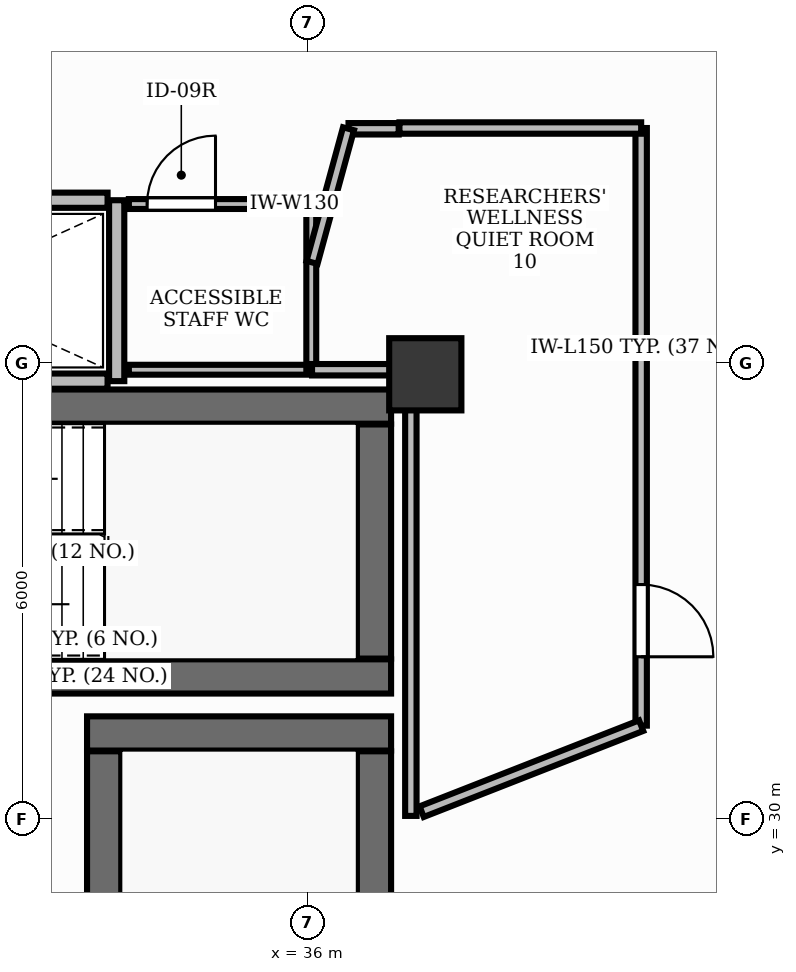
"""IFC4 building model, lengths in metres.
Left out: names, types, materials, properties, quantities, classifications, styles, units other than length and angle.
Written with IfcOpenShell. Run it as: python <this file> out.ifc"""

import sys

from ifc_helpers import new_model, si_unit, direction, frame, frame_2d, origin, origin_2d, place, context, subcontext, project, spatial, rectangle, extrude, element, fill, save


model = new_model("IFC4")
c1 = context("Model", 3, precision=1e-05, world=origin(), true_north=direction((0.0, 1.0)))
c2 = subcontext(c1, "Body", "Model", "MODEL_VIEW")
j1 = project(units=[si_unit("LENGTHUNIT", "METRE"), si_unit("PLANEANGLEUNIT", "RADIAN")], contexts=[c1])
p1 = place(None, origin())
s1 = spatial("IfcSite", under=j1, at=p1, CompositionType="ELEMENT")
p2 = place(p1, origin())
s2 = spatial("IfcBuilding", under=s1, at=p2, CompositionType="ELEMENT")
p3 = place(p2, frame((0.0, 0.0, 115.2)))
s3 = spatial("IfcBuildingStorey", under=s2, at=p3, CompositionType="ELEMENT", Elevation=115.2)
p4 = place(p3, frame((28.852, 35.425, 0.0), z_axis=(0.0, 0.0, 1.0), x_axis=(1.0, 0.0, 0.0)))
e1 = element("IfcWall", 1, at=p4, inside=s3, PredefinedType="SHEAR", context=c2, shape_type="SweptSolid", body=[
    extrude(rectangle(XDim=8.248, YDim=0.45, at=frame_2d((4.124, 0.0))), origin(), (0.0, 0.0, 1.0), 3.9),
])
p5 = place(p3, frame((28.35, 31.875, 0.0), z_axis=(0.0, 0.0, 1.0), x_axis=(1.0, 0.0, 0.0)))
e2 = element("IfcWall", 2, at=p5, inside=s3, PredefinedType="SHEAR", context=c2, shape_type="SweptSolid", body=[
    extrude(rectangle(XDim=8.75, YDim=0.45, at=frame_2d((4.375, 0.0))), origin(), (0.0, 0.0, 1.0), 3.9),
])
p6 = place(p3, frame((36.875, 32.11, 0.0), z_axis=(0.0, 0.0, 1.0), x_axis=(0.0, 1.0, 0.0)))
e3 = element("IfcWall", 3, at=p6, inside=s3, PredefinedType="SHEAR", context=c2, shape_type="SweptSolid", body=[
    extrude(rectangle(XDim=3.08, YDim=0.45, at=frame_2d((1.54, 0.0))), origin(), (0.0, 0.0, 1.0), 3.9),
])
p7 = place(p3, frame((33.1, 31.125, 0.0), z_axis=(0.0, 0.0, 1.0), x_axis=(1.0, 0.0, 0.0)))
e4 = element("IfcWall", 4, at=p7, inside=s3, PredefinedType="SHEAR", context=c2, shape_type="SweptSolid", body=[
    extrude(rectangle(XDim=4.0, YDim=0.45, at=frame_2d((2.0, 0.0))), origin(), (0.0, 0.0, 1.0), 3.9),
])
p8 = place(p3, frame((36.875, 23.11, 0.0), z_axis=(0.0, 0.0, 1.0), x_axis=(0.0, 1.0, 0.0)))
e5 = element("IfcWall", 5, at=p8, inside=s3, PredefinedType="SHEAR", context=c2, shape_type="SweptSolid", body=[
    extrude(rectangle(XDim=7.78, YDim=0.45, at=frame_2d((3.89, 0.0))), origin(), (0.0, 0.0, 1.0), 3.9),
])
p9 = place(p3, frame((33.325, 23.11, 0.0), z_axis=(0.0, 0.0, 1.0), x_axis=(0.0, 1.0, 0.0)))
e6 = element("IfcWall", 6, at=p9, inside=s3, PredefinedType="SHEAR", context=c2, shape_type="SweptSolid", body=[
    extrude(rectangle(XDim=7.78, YDim=0.45, at=frame_2d((3.89, 0.0))), origin(), (0.0, 0.0, 1.0), 3.9),
])
p10 = place(p9, frame((0.2, 0.0, 0.0)))
e7 = element("IfcOpeningElement", 7, at=p10, cuts=e6, PredefinedType="OPENING", context=c2, shape_type="SweptSolid", body=[
    extrude(rectangle(XDim=1.05, YDim=2.15, at=frame_2d((0.525, 1.075))), frame((0.0, 0.24, 0.0), z_axis=(0.0, -1.0, 0.0), x_axis=(1.0, 0.0, 0.0)), (0.0, 0.0, 1.0), 0.48),
])
p11 = place(p3, frame((37.55, 35.85, -0.0), z_axis=(0.0, 0.0, 1.0), x_axis=(1.0, 0.0, 0.0)))
e8 = element("IfcColumn", 8, at=p11, inside=s3, PredefinedType="PILASTER", context=c2, shape_type="SweptSolid", body=[
    extrude(rectangle(XDim=0.95, YDim=0.95, at=origin_2d()), origin(), (0.0, 0.0, 1.0), 3.901),
])
p12 = place(p3, frame((33.49, 35.76, 0.0), z_axis=(0.0, 0.0, 1.0), x_axis=(0.0, 1.0, 0.0)))
e9 = element("IfcWall", 9, at=p12, inside=s3, PredefinedType="PARTITIONING", context=c2, shape_type="SweptSolid", body=[
    extrude(rectangle(XDim=2.38, YDim=0.2, at=frame_2d((1.19, 0.0))), origin(), (0.0, 0.0, 1.0), 2.91),
])
for number, where, z_axis, x_axis in (
    (10, (28.8, 35.76, 0.0), (0.0, 0.0, 1.0), (1.0, 0.0, 0.0)),
    (11, (28.8, 38.14, 0.0), (0.0, 0.0, 1.0), (1.0, 0.0, 0.0)),
):
    element("IfcWall", number, at=place(p3, frame(where, z_axis=z_axis, x_axis=x_axis)), inside=s3, PredefinedType="PARTITIONING", context=c2, shape_type="SweptSolid", body=[
        extrude(rectangle(XDim=4.57, YDim=0.2, at=frame_2d((2.285, 0.0))), origin(), (0.0, 0.0, 1.0), 2.91),
    ])
p13 = place(p3, frame((33.65, 38.09, 0.0), z_axis=(0.0, 0.0, 1.0), x_axis=(1.0, 0.0, 0.0)))
e12 = element("IfcWall", 12, at=p13, inside=s3, PredefinedType="PARTITIONING", context=c2, shape_type="SweptSolid", body=[
    extrude(rectangle(XDim=2.4, YDim=0.13, at=frame_2d((1.2, 0.0))), origin(), (0.0, 0.0, 1.0), 2.91),
])
p14 = place(p13, frame((0.24, 0.0, 0.0)))
e13 = element("IfcOpeningElement", 13, at=p14, cuts=e12, PredefinedType="OPENING", context=c2, shape_type="SweptSolid", body=[
    extrude(rectangle(XDim=0.9, YDim=2.15, at=frame_2d((0.45, 1.075))), frame((0.0, 0.08, 0.0), z_axis=(0.0, -1.0, 0.0), x_axis=(1.0, 0.0, 0.0)), (0.0, 0.0, 1.0), 0.16),
])
p15 = place(p3, frame((40.39, 39.09, 0.0), z_axis=(0.0, 0.0, 1.0), x_axis=(0.0, -1.0, 0.0)))
e14 = element("IfcWall", 14, at=p15, inside=s3, PredefinedType="PARTITIONING", context=c2, shape_type="SweptSolid", body=[
    extrude(rectangle(XDim=7.862, YDim=0.15, at=frame_2d((3.931, 0.0))), origin(), (0.0, 0.0, 1.0), 2.91),
])
p16 = place(p15, frame((6.006, 0.0, 0.0)))
e15 = element("IfcOpeningElement", 15, at=p16, cuts=e14, PredefinedType="OPENING", context=c2, shape_type="SweptSolid", body=[
    extrude(rectangle(XDim=0.95, YDim=2.15, at=frame_2d((0.475, 1.075))), frame((0.0, 0.09, 0.0), z_axis=(0.0, -1.0, 0.0), x_axis=(1.0, 0.0, 0.0)), (0.0, 0.0, 1.0), 0.18),
])
p17 = place(p3, frame((36.05, 35.91, 0.0), z_axis=(0.0, 0.0, 1.0), x_axis=(-1.0, 0.0, 0.0)))
e16 = element("IfcWall", 16, at=p17, inside=s3, PredefinedType="PARTITIONING", context=c2, shape_type="SweptSolid", body=[
    extrude(rectangle(XDim=2.4, YDim=0.13, at=frame_2d((1.2, 0.0))), origin(), (0.0, 0.0, 1.0), 2.91),
])
p18 = place(p3, frame((36.05, 38.09, 0.0), z_axis=(0.0, 0.0, 1.0), x_axis=(0.0, -1.0, 0.0)))
e17 = element("IfcWall", 17, at=p18, inside=s3, PredefinedType="PARTITIONING", context=c2, shape_type="SweptSolid", body=[
    extrude(rectangle(XDim=2.18, YDim=0.13, at=frame_2d((1.09, 0.0))), origin(), (0.0, 0.0, 1.0), 2.91),
])
p19 = place(p3, frame((36.54, 39.08, 0.0), z_axis=(0.0, 0.0, 1.0), x_axis=(1.0, 0.0, 0.0)))
e18 = element("IfcWall", 18, at=p19, inside=s3, PredefinedType="PARTITIONING", context=c2, shape_type="SweptSolid", body=[
    extrude(rectangle(XDim=0.66, YDim=0.15, at=frame_2d((0.33, 0.0))), origin(), (0.0, 0.0, 1.0), 2.91),
])
p20 = place(p3, frame((37.21, 39.09, 0.0), z_axis=(0.0, 0.0, 1.0), x_axis=(1.0, 0.0, 0.0)))
e19 = element("IfcWall", 19, at=p20, inside=s3, PredefinedType="PARTITIONING", context=c2, shape_type="SweptSolid", body=[
    extrude(rectangle(XDim=3.18, YDim=0.15, at=frame_2d((1.59, 0.0))), origin(), (0.0, 0.0, 1.0), 2.91),
])
p21 = place(p3, frame((40.39, 31.228, 0.0), z_axis=(0.0, 0.0, 1.0), x_axis=(-0.931038232899, -0.364921647592, 0.0)))
e20 = element("IfcWall", 20, at=p21, inside=s3, PredefinedType="PARTITIONING", context=c2, shape_type="SweptSolid", body=[
    extrude(rectangle(XDim=3.102, YDim=0.15, at=frame_2d((1.551, 0.0))), origin(), (0.0, 0.0, 1.0), 2.91),
])
p22 = place(p3, frame((37.36, 30.04, 0.0), z_axis=(0.0, 0.0, 1.0), x_axis=(0.0, 1.0, 0.0)))
e21 = element("IfcWall", 21, at=p22, inside=s3, PredefinedType="PARTITIONING", context=c2, shape_type="SweptSolid", body=[
    extrude(rectangle(XDim=5.86, YDim=0.15, at=frame_2d((2.93, 0.0))), origin(), (0.0, 0.0, 1.0), 2.91),
])
p23 = place(p3, frame((37.35, 35.91, 0.0), z_axis=(0.0, 0.0, 1.0), x_axis=(-1.0, 0.0, 0.0)))
e22 = element("IfcWall", 22, at=p23, inside=s3, PredefinedType="PARTITIONING", context=c2, shape_type="SweptSolid", body=[
    extrude(rectangle(XDim=1.29, YDim=0.15, at=frame_2d((0.645, 0.0))), origin(), (0.0, 0.0, 1.0), 2.91),
])
p24 = place(p3, frame((36.06, 37.322, 0.0), z_axis=(0.0, 0.0, 1.0), x_axis=(0.263253435486, 0.964726711927, 0.0)))
e23 = element("IfcWall", 23, at=p24, inside=s3, PredefinedType="PARTITIONING", context=c2, shape_type="SweptSolid", body=[
    extrude(rectangle(XDim=1.822, YDim=0.15, at=frame_2d((0.911, 0.0))), origin(), (0.0, 0.0, 1.0), 2.91),
])
p25 = place(p14, origin())
e24 = element("IfcDoor", 24, at=p25, inside=s3, OperationType="SINGLE_SWING_RIGHT", PredefinedType="DOOR", context=c2, shape_type="SweptSolid", body=[
    extrude(rectangle(XDim=0.9, YDim=2.15, at=frame_2d((0.45, 1.075))), frame((0.0, 0.025, 0.0), z_axis=(0.0, -1.0, 0.0), x_axis=(1.0, 0.0, 0.0)), (0.0, 0.0, 1.0), 0.05),
])
fill(e13, e24)
p26 = place(p16, origin())
e25 = element("IfcDoor", 25, at=p26, inside=s3, OperationType="SINGLE_SWING_RIGHT", PredefinedType="DOOR", context=c2, shape_type="SweptSolid", body=[
    extrude(rectangle(XDim=0.95, YDim=2.15, at=frame_2d((0.475, 1.075))), frame((0.0, 0.025, 0.0), z_axis=(0.0, -1.0, 0.0), x_axis=(1.0, 0.0, 0.0)), (0.0, 0.0, 1.0), 0.05),
])
fill(e15, e25)
save(model, sys.argv[1])
